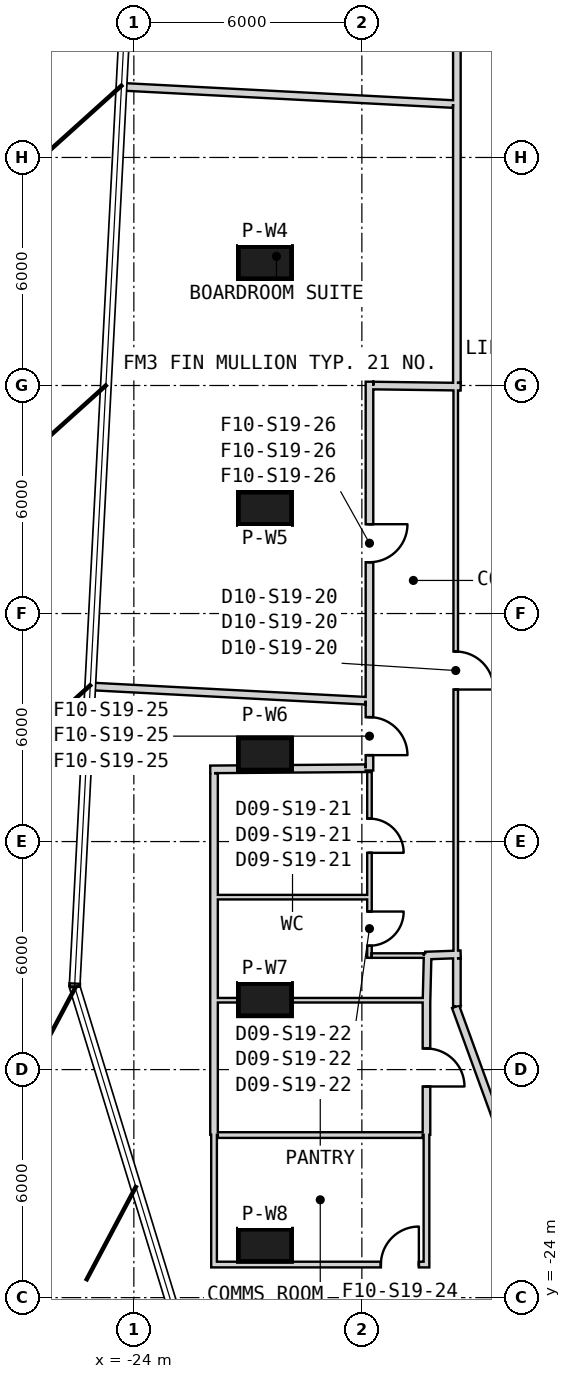
"""IFC4 building model, lengths in metres.
Left out: names, types, materials, properties, quantities, classifications, styles, units other than length and angle.
Written with IfcOpenShell. Run it as: python <this file> out.ifc"""

import sys

from ifc_helpers import new_model, si_unit, direction, frame, frame_2d, origin, origin_2d, place, context, subcontext, project, spatial, rectangle, extrude, element, fill, save


model = new_model("IFC4")
c1 = context("Model", 3, precision=1e-05, world=origin(), true_north=direction((0.0, 1.0)))
c2 = subcontext(c1, "Body", "Model", "MODEL_VIEW")
j1 = project(units=[si_unit("LENGTHUNIT", "METRE"), si_unit("PLANEANGLEUNIT", "RADIAN")], contexts=[c1])
p1 = place(None, origin())
s1 = spatial("IfcSite", under=j1, at=p1, CompositionType="ELEMENT")
p2 = place(p1, origin())
s2 = spatial("IfcBuilding", under=s1, at=p2, CompositionType="ELEMENT")
p3 = place(p2, frame((0.0, 0.0, 310.4)))
s3 = spatial("IfcBuildingStorey", under=s2, at=p3, CompositionType="ELEMENT", Elevation=310.4)
for number, where, z_axis, x_axis in (
    (1, (-20.55, 3.232, 0.0), (0.0, 0.0, 1.0), (-1.0, 0.0, 0.0)),
    (2, (-20.55, -3.232, 0.0), (0.0, 0.0, 1.0), (-1.0, 0.0, 0.0)),
    (3, (-20.55, -9.696, 0.0), (0.0, 0.0, 1.0), (-1.0, 0.0, 0.0)),
    (4, (-20.55, -16.16, 0.0), (0.0, 0.0, 1.0), (-1.0, 0.0, 0.0)),
    (5, (-20.55, -22.624, 0.0), (0.0, 0.0, 1.0), (-1.0, 0.0, 0.0)),
):
    element("IfcColumn", number, at=place(p3, frame(where, z_axis=z_axis, x_axis=x_axis)), inside=s3, PredefinedType="COLUMN", context=c2, shape_type="SweptSolid", body=[
        extrude(rectangle(XDim=1.4, YDim=0.85, at=origin_2d()), origin(), (0.0, 0.0, 1.0), 3.9),
    ])
p4 = place(p3, frame((-10.575, -18.316, 0.0), z_axis=(0.0, 0.0, 1.0), x_axis=(-0.500009446655, -0.866019949687, 0.0)))
e6 = element("IfcWall", 6, at=p4, inside=s3, PredefinedType="SHEAR", context=c2, shape_type="SweptSolid", body=[
    extrude(rectangle(XDim=9.254, YDim=0.6, at=frame_2d((4.627, 0.0))), origin(), (0.0, 0.0, 1.0), 3.9),
])
p5 = place(p4, frame((1.4, 0.0, 0.0)))
e7 = element("IfcOpeningElement", 7, at=p5, cuts=e6, PredefinedType="OPENING", context=c2, shape_type="SweptSolid", body=[
    extrude(rectangle(XDim=1.4, YDim=2.4, at=frame_2d((0.7, 1.2))), frame((0.0, 0.31, 0.0), z_axis=(0.0, -1.0, 0.0), x_axis=(1.0, 0.0, 0.0)), (0.0, 0.0, 1.0), 0.62),
])
p6 = place(p3, frame((-15.53, 0.0, 0.0), z_axis=(0.0, 0.0, 1.0), x_axis=(0.0, -1.0, 0.0)))
e8 = element("IfcWall", 8, at=p6, inside=s3, PredefinedType="PARTITIONING", context=c2, shape_type="SweptSolid", body=[
    extrude(rectangle(XDim=15.0, YDim=0.12, at=frame_2d((7.5, 0.0))), origin(), (0.0, 0.0, 1.0), 2.88),
])
p7 = place(p6, frame((7.0, 0.0, 0.0)))
e9 = element("IfcOpeningElement", 9, at=p7, cuts=e8, PredefinedType="OPENING", context=c2, shape_type="SweptSolid", body=[
    extrude(rectangle(XDim=1.0, YDim=2.1, at=frame_2d((0.5, 1.05))), frame((0.0, 0.07, 0.0), z_axis=(0.0, -1.0, 0.0), x_axis=(1.0, 0.0, 0.0)), (0.0, 0.0, 1.0), 0.14),
])
p8 = place(p3, frame((-17.8, 0.1, 0.0), z_axis=(0.0, 0.0, 1.0), x_axis=(0.0, -1.0, 0.0)))
e10 = element("IfcWall", 10, at=p8, inside=s3, PredefinedType="PARTITIONING", context=c2, shape_type="SweptSolid", body=[
    extrude(rectangle(XDim=8.423, YDim=0.2, at=frame_2d((4.211, 0.0))), origin(), (0.0, 0.0, 1.0), 2.97),
])
p9 = place(p8, frame((3.75, 0.0, 0.0)))
e11 = element("IfcOpeningElement", 11, at=p9, cuts=e10, PredefinedType="OPENING", context=c2, shape_type="SweptSolid", body=[
    extrude(rectangle(XDim=1.0, YDim=2.1, at=frame_2d((0.5, 1.05))), frame((0.0, 0.11, 0.0), z_axis=(0.0, -1.0, 0.0), x_axis=(1.0, 0.0, 0.0)), (0.0, 0.0, 1.0), 0.22),
])
p10 = place(p3, frame((-17.8, -8.323, 0.0), z_axis=(0.0, 0.0, 1.0), x_axis=(0.0, -1.0, 0.0)))
e12 = element("IfcWall", 12, at=p10, inside=s3, PredefinedType="PARTITIONING", context=c2, shape_type="SweptSolid", body=[
    extrude(rectangle(XDim=1.807, YDim=0.2, at=frame_2d((0.904, 0.0))), origin(), (0.0, 0.0, 1.0), 2.97),
])
p11 = place(p10, frame((0.404, 0.0, 0.0)))
e13 = element("IfcOpeningElement", 13, at=p11, cuts=e12, PredefinedType="OPENING", context=c2, shape_type="SweptSolid", body=[
    extrude(rectangle(XDim=1.0, YDim=2.1, at=frame_2d((0.5, 1.05))), frame((0.0, 0.11, 0.0), z_axis=(0.0, -1.0, 0.0), x_axis=(1.0, 0.0, 0.0)), (0.0, 0.0, 1.0), 0.22),
])
p12 = place(p3, frame((-16.33, -15.0, 0.0), z_axis=(0.0, 0.0, 1.0), x_axis=(0.999344339616, 0.036206227059, 0.0)))
e14 = element("IfcWall", 14, at=p12, inside=s3, PredefinedType="PARTITIONING", context=c2, shape_type="SweptSolid", body=[
    extrude(rectangle(XDim=0.93, YDim=0.2, at=frame_2d((0.465, 0.0))), origin(), (0.0, 0.0, 1.0), 3.6),
])
p13 = place(p3, frame((-15.4, -0.031, 0.0), z_axis=(0.0, 0.0, 1.0), x_axis=(-0.999914782125, 0.013054826261, 0.0)))
e15 = element("IfcWall", 15, at=p13, inside=s3, PredefinedType="PARTITIONING", context=c2, shape_type="SweptSolid", body=[
    extrude(rectangle(XDim=2.3, YDim=0.2, at=frame_2d((1.15, 0.0))), origin(), (0.0, 0.0, 1.0), 3.6),
])
p14 = place(p3, frame((-17.8, -10.17, 0.0), z_axis=(0.0, 0.0, 1.0), x_axis=(0.0, -1.0, 0.0)))
e16 = element("IfcWall", 16, at=p14, inside=s3, PredefinedType="PARTITIONING", context=c2, shape_type="SweptSolid", body=[
    extrude(rectangle(XDim=4.89, YDim=0.12, at=frame_2d((2.445, 0.0))), origin(), (0.0, 0.0, 1.0), 2.88),
])
p15 = place(p14, frame((1.226, 0.0, 0.0)))
e17 = element("IfcOpeningElement", 17, at=p15, cuts=e16, PredefinedType="OPENING", context=c2, shape_type="SweptSolid", body=[
    extrude(rectangle(XDim=0.9, YDim=2.1, at=frame_2d((0.45, 1.05))), frame((0.0, 0.07, 0.0), z_axis=(0.0, -1.0, 0.0), x_axis=(1.0, 0.0, 0.0)), (0.0, 0.0, 1.0), 0.14),
])
p16 = place(p14, frame((3.671, 0.0, 0.0)))
e18 = element("IfcOpeningElement", 18, at=p16, cuts=e16, PredefinedType="OPENING", context=c2, shape_type="SweptSolid", body=[
    extrude(rectangle(XDim=0.9, YDim=2.1, at=frame_2d((0.45, 1.05))), frame((0.0, 0.07, 0.0), z_axis=(0.0, -1.0, 0.0), x_axis=(1.0, 0.0, 0.0)), (0.0, 0.0, 1.0), 0.14),
])
p17 = place(p3, frame((-17.74, -15.0, 0.0), z_axis=(0.0, 0.0, 1.0), x_axis=(1.0, 0.0, 0.0)))
e19 = element("IfcWall", 19, at=p17, inside=s3, PredefinedType="PARTITIONING", context=c2, shape_type="SweptSolid", body=[
    extrude(rectangle(XDim=1.37, YDim=0.12, at=frame_2d((0.685, 0.0))), origin(), (0.0, 0.0, 1.0), 3.6),
])
p18 = place(p3, frame((-15.534, -16.346, 0.0), z_axis=(0.0, 0.0, 1.0), x_axis=(0.342001008711, -0.939699584996, 0.0)))
e20 = element("IfcWall", 20, at=p18, inside=s3, PredefinedType="PARTITIONING", context=c2, shape_type="SweptSolid", body=[
    extrude(rectangle(XDim=3.875, YDim=0.2, at=frame_2d((1.938, 0.0))), origin(), (0.0, 0.0, 1.0), 2.88),
])
p19 = place(p3, frame((-15.5, 16.541, 0.0), z_axis=(0.0, 0.0, 1.0), x_axis=(0.0, -1.0, 0.0)))
e21 = element("IfcWall", 21, at=p19, inside=s3, PredefinedType="PARTITIONING", context=c2, shape_type="SweptSolid", body=[
    extrude(rectangle(XDim=9.163, YDim=0.2, at=frame_2d((4.581, 0.0))), origin(), (0.0, 0.0, 1.0), 2.88),
])
p20 = place(p19, frame((4.12, 0.0, 0.0)))
e22 = element("IfcOpeningElement", 22, at=p20, cuts=e21, PredefinedType="OPENING", context=c2, shape_type="SweptSolid", body=[
    extrude(rectangle(XDim=1.0, YDim=2.1, at=frame_2d((0.5, 1.05))), frame((0.0, 0.11, 0.0), z_axis=(0.0, -1.0, 0.0), x_axis=(1.0, 0.0, 0.0)), (0.0, 0.0, 1.0), 0.22),
])
p21 = place(p3, frame((-15.5, 7.378, 0.0), z_axis=(0.0, 0.0, 1.0), x_axis=(0.0, -1.0, 0.0)))
e23 = element("IfcWall", 23, at=p21, inside=s3, PredefinedType="PARTITIONING", context=c2, shape_type="SweptSolid", body=[
    extrude(rectangle(XDim=7.308, YDim=0.2, at=frame_2d((3.654, 0.0))), origin(), (0.0, 0.0, 1.0), 2.97),
])
p22 = place(p3, frame((-15.5, -15.07, 0.0), z_axis=(0.0, 0.0, 1.0), x_axis=(0.0, -1.0, 0.0)))
e24 = element("IfcWall", 24, at=p22, inside=s3, PredefinedType="PARTITIONING", context=c2, shape_type="SweptSolid", body=[
    extrude(rectangle(XDim=1.271, YDim=0.2, at=frame_2d((0.635, 0.0))), origin(), (0.0, 0.0, 1.0), 3.6),
])
p23 = place(p3, frame((-25.148, -7.917, 0.0), z_axis=(0.0, 0.0, 1.0), x_axis=(0.998646853221, -0.052004447423, 0.0)))
e25 = element("IfcWall", 25, at=p23, inside=s3, PredefinedType="PARTITIONING", context=c2, shape_type="SweptSolid", body=[
    extrude(rectangle(XDim=7.258, YDim=0.2, at=frame_2d((3.629, 0.0))), origin(), (0.0, 0.0, 1.0), 2.97),
])
p24 = place(p3, frame((-17.9, -10.071, 0.0), z_axis=(0.0, 0.0, 1.0), x_axis=(-0.999973048838, -0.007341770728, 0.0)))
e26 = element("IfcWall", 26, at=p24, inside=s3, PredefinedType="PARTITIONING", context=c2, shape_type="SweptSolid", body=[
    extrude(rectangle(XDim=4.09, YDim=0.2, at=frame_2d((2.045, 0.0))), origin(), (0.0, 0.0, 1.0), 3.6),
])
p25 = place(p3, frame((-21.89, -10.2, 0.0), z_axis=(0.0, 0.0, 1.0), x_axis=(0.0, -1.0, 0.0)))
e27 = element("IfcWall", 27, at=p25, inside=s3, PredefinedType="PARTITIONING", context=c2, shape_type="SweptSolid", body=[
    extrude(rectangle(XDim=5.975, YDim=0.2, at=frame_2d((2.988, 0.0))), origin(), (0.0, 0.0, 1.0), 3.6),
])
p26 = place(p3, frame((-21.89, -16.175, 0.0), z_axis=(0.0, 0.0, 1.0), x_axis=(0.0, -1.0, 0.0)))
e28 = element("IfcWall", 28, at=p26, inside=s3, PredefinedType="PARTITIONING", context=c2, shape_type="SweptSolid", body=[
    extrude(rectangle(XDim=3.54, YDim=0.2, at=frame_2d((1.77, 0.0))), origin(), (0.0, 0.0, 1.0), 3.6),
])
p27 = place(p3, frame((-16.269, -14.94, 0.0), z_axis=(0.0, 0.0, 1.0), x_axis=(-0.024314076851, -0.999704369135, 0.0)))
e29 = element("IfcWall", 29, at=p27, inside=s3, PredefinedType="PARTITIONING", context=c2, shape_type="SweptSolid", body=[
    extrude(rectangle(XDim=1.295, YDim=0.2, at=frame_2d((0.648, 0.0))), origin(), (0.0, 0.0, 1.0), 3.6),
])
p28 = place(p3, frame((-16.3, -16.115, 0.0), z_axis=(0.0, 0.0, 1.0), x_axis=(0.0, -1.0, 0.0)))
e30 = element("IfcWall", 30, at=p28, inside=s3, PredefinedType="PARTITIONING", context=c2, shape_type="SweptSolid", body=[
    extrude(rectangle(XDim=3.6, YDim=0.2, at=frame_2d((1.8, 0.0))), origin(), (0.0, 0.0, 1.0), 2.88),
])
p29 = place(p28, frame((1.33, 0.0, 0.0)))
e31 = element("IfcOpeningElement", 31, at=p29, cuts=e30, PredefinedType="OPENING", context=c2, shape_type="SweptSolid", body=[
    extrude(rectangle(XDim=1.0, YDim=2.1, at=frame_2d((0.5, 1.05))), frame((0.0, 0.11, 0.0), z_axis=(0.0, -1.0, 0.0), x_axis=(1.0, 0.0, 0.0)), (0.0, 0.0, 1.0), 0.22),
])
p30 = place(p3, frame((-21.89, -19.715, 0.0), z_axis=(0.0, 0.0, 1.0), x_axis=(0.0, -1.0, 0.0)))
e32 = element("IfcWall", 32, at=p30, inside=s3, PredefinedType="PLUMBINGWALL", context=c2, shape_type="SweptSolid", body=[
    extrude(rectangle(XDim=3.49, YDim=0.15, at=frame_2d((1.745, 0.0))), origin(), (0.0, 0.0, 1.0), 3.6),
])
p31 = place(p3, frame((-21.815, -23.13, 0.0), z_axis=(0.0, 0.0, 1.0), x_axis=(1.0, 0.0, 0.0)))
e33 = element("IfcWall", 33, at=p31, inside=s3, PredefinedType="PLUMBINGWALL", context=c2, shape_type="SweptSolid", body=[
    extrude(rectangle(XDim=5.59, YDim=0.15, at=frame_2d((2.795, 0.0))), origin(), (0.0, 0.0, 1.0), 3.6),
])
p32 = place(p31, frame((4.315, 0.0, 0.0)))
e34 = element("IfcOpeningElement", 34, at=p32, cuts=e33, PredefinedType="OPENING", context=c2, shape_type="SweptSolid", body=[
    extrude(rectangle(XDim=1.0, YDim=2.1, at=frame_2d((0.5, 1.05))), frame((0.0, 0.085, 0.0), z_axis=(0.0, -1.0, 0.0), x_axis=(1.0, 0.0, 0.0)), (0.0, 0.0, 1.0), 0.17),
])
p33 = place(p3, frame((-16.3, -19.715, 0.0), z_axis=(0.0, 0.0, 1.0), x_axis=(0.0, -1.0, 0.0)))
e35 = element("IfcWall", 35, at=p33, inside=s3, PredefinedType="PLUMBINGWALL", context=c2, shape_type="SweptSolid", body=[
    extrude(rectangle(XDim=3.34, YDim=0.15, at=frame_2d((1.67, 0.0))), origin(), (0.0, 0.0, 1.0), 3.6),
])
p34 = place(p3, frame((-24.326, 7.86, 0.0), z_axis=(0.0, 0.0, 1.0), x_axis=(0.998647308215, -0.051995709386, 0.0)))
e36 = element("IfcWall", 36, at=p34, inside=s3, PredefinedType="PARTITIONING", context=c2, shape_type="SweptSolid", body=[
    extrude(rectangle(XDim=8.738, YDim=0.2, at=frame_2d((4.369, 0.0))), origin(), (0.0, 0.0, 1.0), 2.97),
])
p35 = place(p3, frame((-21.79, -13.463, 0.0), z_axis=(0.0, 0.0, 1.0), x_axis=(1.0, 0.0, 0.0)))
e37 = element("IfcWall", 37, at=p35, inside=s3, PredefinedType="PARTITIONING", context=c2, shape_type="SweptSolid", body=[
    extrude(rectangle(XDim=3.93, YDim=0.12, at=frame_2d((1.965, 0.0))), origin(), (0.0, 0.0, 1.0), 3.6),
])
p36 = place(p3, frame((-16.4, -16.175, 0.0), z_axis=(0.0, 0.0, 1.0), x_axis=(-1.0, 0.0, 0.0)))
e38 = element("IfcWall", 38, at=p36, inside=s3, PredefinedType="PARTITIONING", context=c2, shape_type="SweptSolid", body=[
    extrude(rectangle(XDim=5.39, YDim=0.12, at=frame_2d((2.695, 0.0))), origin(), (0.0, 0.0, 1.0), 3.6),
])
p37 = place(p3, frame((-21.79, -19.723, 0.0), z_axis=(0.0, 0.0, 1.0), x_axis=(1.0, 0.0, 0.0)))
e39 = element("IfcWall", 39, at=p37, inside=s3, PredefinedType="PLUMBINGWALL", context=c2, shape_type="SweptSolid", body=[
    extrude(rectangle(XDim=5.39, YDim=0.15, at=frame_2d((2.695, 0.0))), origin(), (0.0, 0.0, 1.0), 2.88),
])
p38 = place(p7, origin())
e40 = element("IfcDoor", 40, at=p38, inside=s3, OperationType="SINGLE_SWING_LEFT", PredefinedType="NOTDEFINED", context=c2, shape_type="SweptSolid", body=[
    extrude(rectangle(XDim=1.0, YDim=2.1, at=frame_2d((0.5, 1.05))), frame((0.0, 0.025, 0.0), z_axis=(0.0, -1.0, 0.0), x_axis=(1.0, 0.0, 0.0)), (0.0, 0.0, 1.0), 0.05),
])
fill(e9, e40)
p39 = place(p15, origin())
e41 = element("IfcDoor", 41, at=p39, inside=s3, OperationType="SINGLE_SWING_RIGHT", PredefinedType="NOTDEFINED", context=c2, shape_type="SweptSolid", body=[
    extrude(rectangle(XDim=0.9, YDim=2.1, at=frame_2d((0.45, 1.05))), frame((0.0, 0.025, 0.0), z_axis=(0.0, -1.0, 0.0), x_axis=(1.0, 0.0, 0.0)), (0.0, 0.0, 1.0), 0.05),
])
fill(e17, e41)
p40 = place(p16, origin())
e42 = element("IfcDoor", 42, at=p40, inside=s3, OperationType="SINGLE_SWING_RIGHT", PredefinedType="NOTDEFINED", context=c2, shape_type="SweptSolid", body=[
    extrude(rectangle(XDim=0.9, YDim=2.1, at=frame_2d((0.45, 1.05))), frame((0.0, 0.025, 0.0), z_axis=(0.0, -1.0, 0.0), x_axis=(1.0, 0.0, 0.0)), (0.0, 0.0, 1.0), 0.05),
])
fill(e18, e42)
p41 = place(p29, origin())
e43 = element("IfcDoor", 43, at=p41, inside=s3, OperationType="SINGLE_SWING_LEFT", PredefinedType="USERDEFINED", context=c2, shape_type="SweptSolid", body=[
    extrude(rectangle(XDim=1.0, YDim=2.1, at=frame_2d((0.5, 1.05))), frame((0.0, 0.025, 0.0), z_axis=(0.0, -1.0, 0.0), x_axis=(1.0, 0.0, 0.0)), (0.0, 0.0, 1.0), 0.05),
])
fill(e31, e43)
p42 = place(p32, origin())
e44 = element("IfcDoor", 44, at=p42, inside=s3, OperationType="SINGLE_SWING_LEFT", PredefinedType="USERDEFINED", context=c2, shape_type="SweptSolid", body=[
    extrude(rectangle(XDim=1.0, YDim=2.1, at=frame_2d((0.5, 1.05))), frame((0.0, 0.025, 0.0), z_axis=(0.0, -1.0, 0.0), x_axis=(1.0, 0.0, 0.0)), (0.0, 0.0, 1.0), 0.05),
])
fill(e34, e44)
p43 = place(p11, origin())
e45 = element("IfcDoor", 45, at=p43, inside=s3, OperationType="SINGLE_SWING_RIGHT", PredefinedType="USERDEFINED", context=c2, shape_type="SweptSolid", body=[
    extrude(rectangle(XDim=1.0, YDim=2.1, at=frame_2d((0.5, 1.05))), frame((0.0, 0.025, 0.0), z_axis=(0.0, -1.0, 0.0), x_axis=(1.0, 0.0, 0.0)), (0.0, 0.0, 1.0), 0.05),
])
fill(e13, e45)
p44 = place(p9, origin())
e46 = element("IfcDoor", 46, at=p44, inside=s3, OperationType="SINGLE_SWING_RIGHT", PredefinedType="USERDEFINED", context=c2, shape_type="SweptSolid", body=[
    extrude(rectangle(XDim=1.0, YDim=2.1, at=frame_2d((0.5, 1.05))), frame((0.0, 0.025, 0.0), z_axis=(0.0, -1.0, 0.0), x_axis=(1.0, 0.0, 0.0)), (0.0, 0.0, 1.0), 0.05),
])
fill(e11, e46)
save(model, sys.argv[1])
